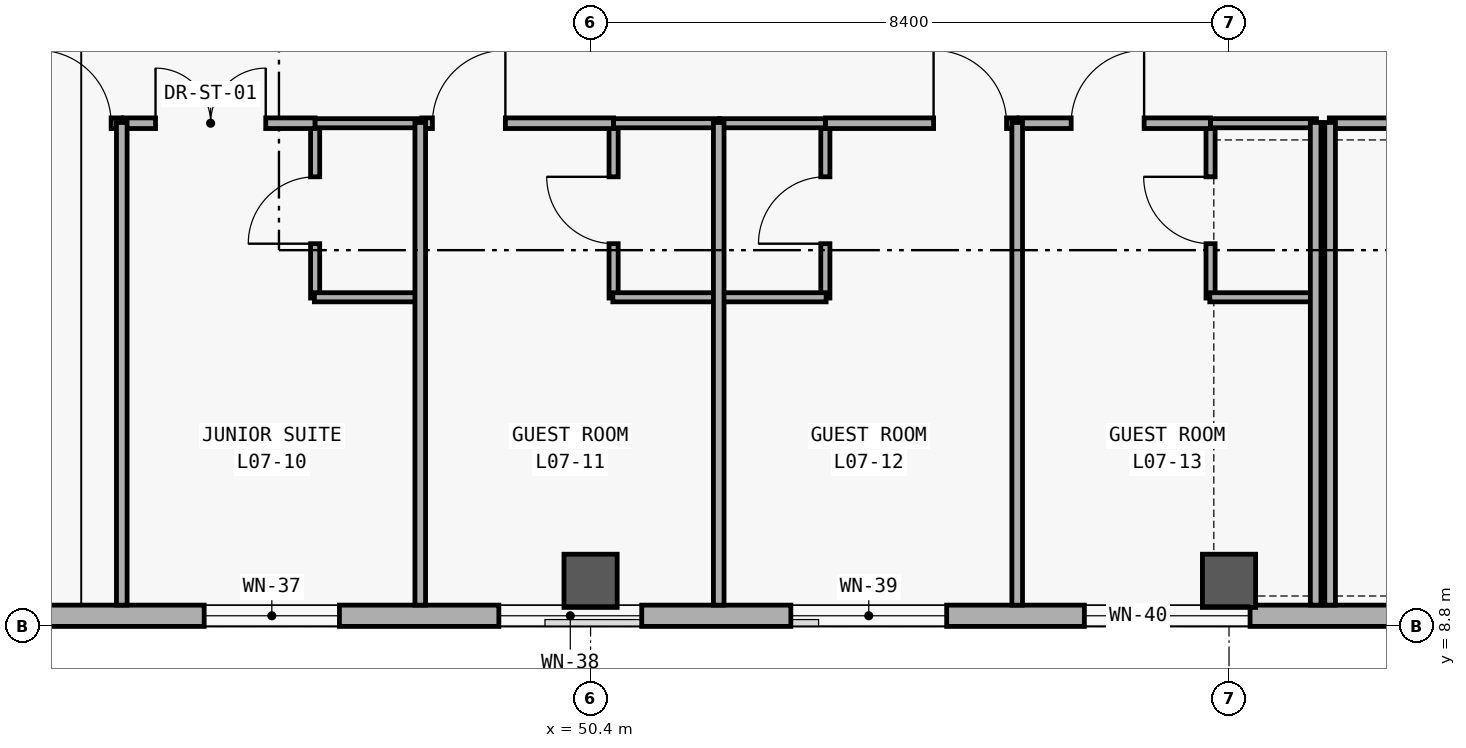
"""IFC4 building model, lengths in metres.
Left out: names, types, materials, properties, quantities, classifications, styles, units other than length and angle.
Written with IfcOpenShell. Run it as: python <this file> out.ifc"""

import sys

from ifc_helpers import new_model, si_unit, direction, frame, frame_2d, origin, origin_2d, place, context, subcontext, project, spatial, rectangle, extrude, element, fill, save


model = new_model("IFC4")
c1 = context("Model", 3, precision=1e-05, world=origin(), true_north=direction((0.0, 1.0)))
c2 = subcontext(c1, "Body", "Model", "MODEL_VIEW")
j1 = project(units=[si_unit("LENGTHUNIT", "METRE"), si_unit("PLANEANGLEUNIT", "RADIAN")], contexts=[c1])
p1 = place(None, origin())
s1 = spatial("IfcSite", under=j1, at=p1, CompositionType="ELEMENT")
p2 = place(p1, origin())
s2 = spatial("IfcBuilding", under=s1, at=p2, CompositionType="ELEMENT")
p3 = place(p2, frame((0.0, 0.0, 30.0)))
s3 = spatial("IfcBuildingStorey", under=s2, at=p3, CompositionType="ELEMENT", Elevation=30.0)
for number, where, z_axis, x_axis in (
    (1, (50.4, 9.4, 0.0), (0.0, 0.0, 1.0), (1.0, 0.0, 0.0)),
    (2, (58.8, 9.4, 0.0), (0.0, 0.0, 1.0), (1.0, 0.0, 0.0)),
):
    element("IfcColumn", number, at=place(p3, frame(where, z_axis=z_axis, x_axis=x_axis)), inside=s3, PredefinedType="COLUMN", context=c2, shape_type="SweptSolid", body=[
        extrude(rectangle(XDim=0.7, YDim=0.7, at=origin_2d()), origin(), (0.0, 0.0, 1.0), 3.6),
    ])
p4 = place(p3, frame((75.32, 8.94, 0.0), z_axis=(0.0, 0.0, 1.0), x_axis=(-1.0, 0.0, 0.0)))
e3 = element("IfcWall", 3, at=p4, inside=s3, PredefinedType="SOLIDWALL", context=c2, shape_type="SweptSolid", body=[
    extrude(rectangle(XDim=66.64, YDim=0.28, at=frame_2d((33.32, 0.0))), origin(), (0.0, 0.0, 1.0), 3.34),
])
p5 = place(p4, frame((6.47, 0.0, 0.85)))
e4 = element("IfcOpeningElement", 4, at=p5, cuts=e3, PredefinedType="OPENING", context=c2, shape_type="SweptSolid", body=[
    extrude(rectangle(XDim=2.4, YDim=1.8, at=frame_2d((1.2, 0.9))), frame((0.0, 0.15, 0.0), z_axis=(0.0, -1.0, 0.0), x_axis=(1.0, 0.0, 0.0)), (0.0, 0.0, 1.0), 0.3),
])
p6 = place(p4, frame((63.606, 0.0, 0.85)))
e5 = element("IfcOpeningElement", 5, at=p6, cuts=e3, PredefinedType="OPENING", context=c2, shape_type="SweptSolid", body=[
    extrude(rectangle(XDim=1.7, YDim=2.0, at=frame_2d((0.85, 1.0))), frame((0.0, 0.15, 0.0), z_axis=(0.0, -1.0, 0.0), x_axis=(1.0, 0.0, 0.0)), (0.0, 0.0, 1.0), 0.3),
])
p7 = place(p4, frame((59.379, 0.0, 0.85)))
e6 = element("IfcOpeningElement", 6, at=p7, cuts=e3, PredefinedType="OPENING", context=c2, shape_type="SweptSolid", body=[
    extrude(rectangle(XDim=2.3, YDim=2.05, at=frame_2d((1.15, 1.025))), frame((0.0, 0.15, 0.0), z_axis=(0.0, -1.0, 0.0), x_axis=(1.0, 0.0, 0.0)), (0.0, 0.0, 1.0), 0.3),
])
p8 = place(p4, frame((55.227, 0.0, 0.85)))
e7 = element("IfcOpeningElement", 7, at=p8, cuts=e3, PredefinedType="OPENING", context=c2, shape_type="SweptSolid", body=[
    extrude(rectangle(XDim=2.75, YDim=2.1, at=frame_2d((1.375, 1.05))), frame((0.0, 0.15, 0.0), z_axis=(0.0, -1.0, 0.0), x_axis=(1.0, 0.0, 0.0)), (0.0, 0.0, 1.0), 0.3),
])
p9 = place(p4, frame((52.085, 0.0, 0.85)))
e8 = element("IfcOpeningElement", 8, at=p9, cuts=e3, PredefinedType="OPENING", context=c2, shape_type="SweptSolid", body=[
    extrude(rectangle(XDim=1.18, YDim=1.5, at=frame_2d((0.59, 0.75))), frame((0.0, 0.15, 0.0), z_axis=(0.0, -1.0, 0.0), x_axis=(1.0, 0.0, 0.0)), (0.0, 0.0, 1.0), 0.3),
])
p10 = place(p4, frame((48.108, 0.0, 0.85)))
e9 = element("IfcOpeningElement", 9, at=p10, cuts=e3, PredefinedType="OPENING", context=c2, shape_type="SweptSolid", body=[
    extrude(rectangle(XDim=1.28, YDim=1.6, at=frame_2d((0.64, 0.8))), frame((0.0, 0.15, 0.0), z_axis=(0.0, -1.0, 0.0), x_axis=(1.0, 0.0, 0.0)), (0.0, 0.0, 1.0), 0.3),
])
p11 = place(p4, frame((44.131, 0.0, 0.85)))
e10 = element("IfcOpeningElement", 10, at=p11, cuts=e3, PredefinedType="OPENING", context=c2, shape_type="SweptSolid", body=[
    extrude(rectangle(XDim=1.38, YDim=1.7, at=frame_2d((0.69, 0.85))), frame((0.0, 0.15, 0.0), z_axis=(0.0, -1.0, 0.0), x_axis=(1.0, 0.0, 0.0)), (0.0, 0.0, 1.0), 0.3),
])
p12 = place(p4, frame((40.155, 0.0, 0.85)))
e11 = element("IfcOpeningElement", 11, at=p12, cuts=e3, PredefinedType="OPENING", context=c2, shape_type="SweptSolid", body=[
    extrude(rectangle(XDim=1.48, YDim=1.8, at=frame_2d((0.74, 0.9))), frame((0.0, 0.15, 0.0), z_axis=(0.0, -1.0, 0.0), x_axis=(1.0, 0.0, 0.0)), (0.0, 0.0, 1.0), 0.3),
])
p13 = place(p4, frame((36.178, 0.0, 0.85)))
e12 = element("IfcOpeningElement", 12, at=p13, cuts=e3, PredefinedType="OPENING", context=c2, shape_type="SweptSolid", body=[
    extrude(rectangle(XDim=1.58, YDim=1.85, at=frame_2d((0.79, 0.925))), frame((0.0, 0.15, 0.0), z_axis=(0.0, -1.0, 0.0), x_axis=(1.0, 0.0, 0.0)), (0.0, 0.0, 1.0), 0.3),
])
p14 = place(p4, frame((32.201, 0.0, 0.85)))
e13 = element("IfcOpeningElement", 13, at=p14, cuts=e3, PredefinedType="OPENING", context=c2, shape_type="SweptSolid", body=[
    extrude(rectangle(XDim=1.68, YDim=1.9, at=frame_2d((0.84, 0.95))), frame((0.0, 0.15, 0.0), z_axis=(0.0, -1.0, 0.0), x_axis=(1.0, 0.0, 0.0)), (0.0, 0.0, 1.0), 0.3),
])
p15 = place(p4, frame((28.224, 0.0, 0.85)))
e14 = element("IfcOpeningElement", 14, at=p15, cuts=e3, PredefinedType="OPENING", context=c2, shape_type="SweptSolid", body=[
    extrude(rectangle(XDim=1.78, YDim=1.95, at=frame_2d((0.89, 0.975))), frame((0.0, 0.15, 0.0), z_axis=(0.0, -1.0, 0.0), x_axis=(1.0, 0.0, 0.0)), (0.0, 0.0, 1.0), 0.3),
])
p16 = place(p4, frame((24.247, 0.0, 0.85)))
e15 = element("IfcOpeningElement", 15, at=p16, cuts=e3, PredefinedType="OPENING", context=c2, shape_type="SweptSolid", body=[
    extrude(rectangle(XDim=1.88, YDim=1.95, at=frame_2d((0.94, 0.975))), frame((0.0, 0.15, 0.0), z_axis=(0.0, -1.0, 0.0), x_axis=(1.0, 0.0, 0.0)), (0.0, 0.0, 1.0), 0.3),
])
p17 = place(p4, frame((20.235, 0.0, 0.85)))
e16 = element("IfcOpeningElement", 16, at=p17, cuts=e3, PredefinedType="OPENING", context=c2, shape_type="SweptSolid", body=[
    extrude(rectangle(XDim=2.05, YDim=1.95, at=frame_2d((1.025, 0.975))), frame((0.0, 0.15, 0.0), z_axis=(0.0, -1.0, 0.0), x_axis=(1.0, 0.0, 0.0)), (0.0, 0.0, 1.0), 0.3),
])
p18 = place(p4, frame((16.243, 0.0, 0.85)))
e17 = element("IfcOpeningElement", 17, at=p18, cuts=e3, PredefinedType="OPENING", context=c2, shape_type="SweptSolid", body=[
    extrude(rectangle(XDim=2.18, YDim=1.95, at=frame_2d((1.09, 0.975))), frame((0.0, 0.15, 0.0), z_axis=(0.0, -1.0, 0.0), x_axis=(1.0, 0.0, 0.0)), (0.0, 0.0, 1.0), 0.3),
])
p19 = place(p3, frame((46.776, 13.12, 0.0), z_axis=(0.0, 0.0, 1.0), x_axis=(0.0, 1.0, 0.0)))
e18 = element("IfcWall", 18, at=p19, inside=s3, PredefinedType="PARTITIONING", context=c2, shape_type="SweptSolid", body=[
    extrude(rectangle(XDim=2.31, YDim=0.12, at=frame_2d((1.155, 0.0))), origin(), (0.0, 0.0, 1.0), 2.48),
])
p20 = place(p19, frame((0.715, 0.0, 0.0)))
e19 = element("IfcOpeningElement", 19, at=p20, cuts=e18, PredefinedType="OPENING", context=c2, shape_type="SweptSolid", body=[
    extrude(rectangle(XDim=0.88, YDim=2.15, at=frame_2d((0.44, 1.075))), frame((0.0, 0.07, 0.0), z_axis=(0.0, -1.0, 0.0), x_axis=(1.0, 0.0, 0.0)), (0.0, 0.0, 1.0), 0.14),
])
p21 = place(p3, frame((50.703, 13.12, 0.0), z_axis=(0.0, 0.0, 1.0), x_axis=(0.0, 1.0, 0.0)))
e20 = element("IfcWall", 20, at=p21, inside=s3, PredefinedType="PARTITIONING", context=c2, shape_type="SweptSolid", body=[
    extrude(rectangle(XDim=2.31, YDim=0.12, at=frame_2d((1.155, 0.0))), origin(), (0.0, 0.0, 1.0), 2.48),
])
p22 = place(p21, frame((0.715, 0.0, 0.0)))
e21 = element("IfcOpeningElement", 21, at=p22, cuts=e20, PredefinedType="OPENING", context=c2, shape_type="SweptSolid", body=[
    extrude(rectangle(XDim=0.88, YDim=2.15, at=frame_2d((0.44, 1.075))), frame((0.0, 0.07, 0.0), z_axis=(0.0, -1.0, 0.0), x_axis=(1.0, 0.0, 0.0)), (0.0, 0.0, 1.0), 0.14),
])
p23 = place(p3, frame((53.489, 13.12, 0.0), z_axis=(0.0, 0.0, 1.0), x_axis=(0.0, 1.0, 0.0)))
e22 = element("IfcWall", 22, at=p23, inside=s3, PredefinedType="PARTITIONING", context=c2, shape_type="SweptSolid", body=[
    extrude(rectangle(XDim=2.31, YDim=0.12, at=frame_2d((1.155, 0.0))), origin(), (0.0, 0.0, 1.0), 2.48),
])
p24 = place(p23, frame((0.715, 0.0, 0.0)))
e23 = element("IfcOpeningElement", 23, at=p24, cuts=e22, PredefinedType="OPENING", context=c2, shape_type="SweptSolid", body=[
    extrude(rectangle(XDim=0.88, YDim=2.15, at=frame_2d((0.44, 1.075))), frame((0.0, 0.07, 0.0), z_axis=(0.0, -1.0, 0.0), x_axis=(1.0, 0.0, 0.0)), (0.0, 0.0, 1.0), 0.14),
])
p25 = place(p3, frame((58.557, 13.12, 0.0), z_axis=(0.0, 0.0, 1.0), x_axis=(0.0, 1.0, 0.0)))
e24 = element("IfcWall", 24, at=p25, inside=s3, PredefinedType="PARTITIONING", context=c2, shape_type="SweptSolid", body=[
    extrude(rectangle(XDim=2.31, YDim=0.12, at=frame_2d((1.155, 0.0))), origin(), (0.0, 0.0, 1.0), 2.48),
])
p26 = place(p25, frame((0.715, 0.0, 0.0)))
e25 = element("IfcOpeningElement", 25, at=p26, cuts=e24, PredefinedType="OPENING", context=c2, shape_type="SweptSolid", body=[
    extrude(rectangle(XDim=0.88, YDim=2.15, at=frame_2d((0.44, 1.075))), frame((0.0, 0.07, 0.0), z_axis=(0.0, -1.0, 0.0), x_axis=(1.0, 0.0, 0.0)), (0.0, 0.0, 1.0), 0.14),
])
p27 = place(p3, frame((60.12, 15.42, 0.0), z_axis=(0.0, 0.0, 1.0), x_axis=(1.0, 0.0, 0.0)))
e26 = element("IfcWall", 26, at=p27, inside=s3, PredefinedType="PARTITIONING", context=c2, shape_type="SweptSolid", body=[
    extrude(rectangle(XDim=15.2, YDim=0.14, at=frame_2d((7.6, 0.0))), origin(), (0.0, 0.0, 1.0), 2.48),
])
p28 = place(p27, frame((2.071, 0.0, 0.0)))
e27 = element("IfcOpeningElement", 27, at=p28, cuts=e26, PredefinedType="OPENING", context=c2, shape_type="SweptSolid", body=[
    extrude(rectangle(XDim=1.08, YDim=2.25, at=frame_2d((0.54, 1.125))), frame((0.0, 0.08, 0.0), z_axis=(0.0, -1.0, 0.0), x_axis=(1.0, 0.0, 0.0)), (0.0, 0.0, 1.0), 0.16),
])
p29 = place(p3, frame((41.708, 15.42, 0.0), z_axis=(0.0, 0.0, 1.0), x_axis=(1.0, 0.0, 0.0)))
e28 = element("IfcWall", 28, at=p29, inside=s3, PredefinedType="PARTITIONING", context=c2, shape_type="SweptSolid", body=[
    extrude(rectangle(XDim=2.524, YDim=0.14, at=frame_2d((1.262, 0.0))), origin(), (0.0, 0.0, 1.0), 2.48),
])
p30 = place(p29, frame((1.424, 0.0, 0.0)))
e29 = element("IfcOpeningElement", 29, at=p30, cuts=e28, PredefinedType="OPENING", context=c2, shape_type="SweptSolid", body=[
    extrude(rectangle(XDim=0.96, YDim=2.25, at=frame_2d((0.48, 1.125))), frame((0.0, 0.08, 0.0), z_axis=(0.0, -1.0, 0.0), x_axis=(1.0, 0.0, 0.0)), (0.0, 0.0, 1.0), 0.16),
])
p31 = place(p3, frame((44.252, 15.42, 0.0), z_axis=(0.0, 0.0, 1.0), x_axis=(1.0, 0.0, 0.0)))
e30 = element("IfcWall", 30, at=p31, inside=s3, PredefinedType="PARTITIONING", context=c2, shape_type="SweptSolid", body=[
    extrude(rectangle(XDim=2.524, YDim=0.14, at=frame_2d((1.262, 0.0))), origin(), (0.0, 0.0, 1.0), 2.48),
])
p32 = place(p31, frame((0.424, 0.0, 0.0)))
e31 = element("IfcOpeningElement", 31, at=p32, cuts=e30, PredefinedType="OPENING", context=c2, shape_type="SweptSolid", body=[
    extrude(rectangle(XDim=1.45, YDim=2.3, at=frame_2d((0.725, 1.15))), frame((0.0, 0.08, 0.0), z_axis=(0.0, -1.0, 0.0), x_axis=(1.0, 0.0, 0.0)), (0.0, 0.0, 1.0), 0.16),
])
p33 = place(p3, frame((48.179, 15.42, 0.0), z_axis=(0.0, 0.0, 1.0), x_axis=(1.0, 0.0, 0.0)))
e32 = element("IfcWall", 32, at=p33, inside=s3, PredefinedType="PARTITIONING", context=c2, shape_type="SweptSolid", body=[
    extrude(rectangle(XDim=2.524, YDim=0.14, at=frame_2d((1.262, 0.0))), origin(), (0.0, 0.0, 1.0), 2.48),
])
p34 = place(p33, frame((0.14, 0.0, 0.0)))
e33 = element("IfcOpeningElement", 33, at=p34, cuts=e32, PredefinedType="OPENING", context=c2, shape_type="SweptSolid", body=[
    extrude(rectangle(XDim=0.96, YDim=2.25, at=frame_2d((0.48, 1.125))), frame((0.0, 0.08, 0.0), z_axis=(0.0, -1.0, 0.0), x_axis=(1.0, 0.0, 0.0)), (0.0, 0.0, 1.0), 0.16),
])
p35 = place(p3, frame((53.489, 15.42, 0.0), z_axis=(0.0, 0.0, 1.0), x_axis=(1.0, 0.0, 0.0)))
e34 = element("IfcWall", 34, at=p35, inside=s3, PredefinedType="PARTITIONING", context=c2, shape_type="SweptSolid", body=[
    extrude(rectangle(XDim=2.524, YDim=0.14, at=frame_2d((1.262, 0.0))), origin(), (0.0, 0.0, 1.0), 2.48),
])
p36 = place(p35, frame((1.424, 0.0, 0.0)))
e35 = element("IfcOpeningElement", 35, at=p36, cuts=e34, PredefinedType="OPENING", context=c2, shape_type="SweptSolid", body=[
    extrude(rectangle(XDim=0.96, YDim=2.25, at=frame_2d((0.48, 1.125))), frame((0.0, 0.08, 0.0), z_axis=(0.0, -1.0, 0.0), x_axis=(1.0, 0.0, 0.0)), (0.0, 0.0, 1.0), 0.16),
])
p37 = place(p3, frame((56.033, 15.42, 0.0), z_axis=(0.0, 0.0, 1.0), x_axis=(1.0, 0.0, 0.0)))
e36 = element("IfcWall", 36, at=p37, inside=s3, PredefinedType="PARTITIONING", context=c2, shape_type="SweptSolid", body=[
    extrude(rectangle(XDim=2.524, YDim=0.14, at=frame_2d((1.262, 0.0))), origin(), (0.0, 0.0, 1.0), 2.48),
])
p38 = place(p37, frame((0.69, 0.0, 0.0)))
e37 = element("IfcOpeningElement", 37, at=p38, cuts=e36, PredefinedType="OPENING", context=c2, shape_type="SweptSolid", body=[
    extrude(rectangle(XDim=0.96, YDim=2.25, at=frame_2d((0.48, 1.125))), frame((0.0, 0.08, 0.0), z_axis=(0.0, -1.0, 0.0), x_axis=(1.0, 0.0, 0.0)), (0.0, 0.0, 1.0), 0.16),
])
p39 = place(p3, frame((46.766, 13.13, 0.0), z_axis=(0.0, 0.0, 1.0), x_axis=(1.0, 0.0, 0.0)))
e38 = element("IfcWall", 38, at=p39, inside=s3, PredefinedType="PARTITIONING", context=c2, shape_type="SweptSolid", body=[
    extrude(rectangle(XDim=1.403, YDim=0.12, at=frame_2d((0.701, 0.0))), origin(), (0.0, 0.0, 1.0), 2.48),
])
p40 = place(p3, frame((46.776, 15.42, 0.0), z_axis=(0.0, 0.0, 1.0), x_axis=(1.0, 0.0, 0.0)))
e39 = element("IfcWall", 39, at=p40, inside=s3, PredefinedType="PARTITIONING", context=c2, shape_type="SweptSolid", body=[
    extrude(rectangle(XDim=1.393, YDim=0.12, at=frame_2d((0.697, 0.0))), origin(), (0.0, 0.0, 1.0), 2.48),
])
p41 = place(p3, frame((50.693, 13.13, 0.0), z_axis=(0.0, 0.0, 1.0), x_axis=(1.0, 0.0, 0.0)))
e40 = element("IfcWall", 40, at=p41, inside=s3, PredefinedType="PARTITIONING", context=c2, shape_type="SweptSolid", body=[
    extrude(rectangle(XDim=1.403, YDim=0.12, at=frame_2d((0.701, 0.0))), origin(), (0.0, 0.0, 1.0), 2.48),
])
p42 = place(p3, frame((50.703, 15.42, 0.0), z_axis=(0.0, 0.0, 1.0), x_axis=(1.0, 0.0, 0.0)))
e41 = element("IfcWall", 41, at=p42, inside=s3, PredefinedType="PARTITIONING", context=c2, shape_type="SweptSolid", body=[
    extrude(rectangle(XDim=1.393, YDim=0.12, at=frame_2d((0.697, 0.0))), origin(), (0.0, 0.0, 1.0), 2.48),
])
p43 = place(p3, frame((52.096, 13.13, 0.0), z_axis=(0.0, 0.0, 1.0), x_axis=(1.0, 0.0, 0.0)))
e42 = element("IfcWall", 42, at=p43, inside=s3, PredefinedType="PARTITIONING", context=c2, shape_type="SweptSolid", body=[
    extrude(rectangle(XDim=1.403, YDim=0.12, at=frame_2d((0.702, 0.0))), origin(), (0.0, 0.0, 1.0), 2.48),
])
p44 = place(p3, frame((52.096, 15.42, 0.0), z_axis=(0.0, 0.0, 1.0), x_axis=(1.0, 0.0, 0.0)))
e43 = element("IfcWall", 43, at=p44, inside=s3, PredefinedType="PARTITIONING", context=c2, shape_type="SweptSolid", body=[
    extrude(rectangle(XDim=1.393, YDim=0.12, at=frame_2d((0.697, 0.0))), origin(), (0.0, 0.0, 1.0), 2.48),
])
p45 = place(p3, frame((58.547, 13.13, 0.0), z_axis=(0.0, 0.0, 1.0), x_axis=(1.0, 0.0, 0.0)))
e44 = element("IfcWall", 44, at=p45, inside=s3, PredefinedType="PARTITIONING", context=c2, shape_type="SweptSolid", body=[
    extrude(rectangle(XDim=1.403, YDim=0.12, at=frame_2d((0.701, 0.0))), origin(), (0.0, 0.0, 1.0), 2.48),
])
p46 = place(p3, frame((58.557, 15.42, 0.0), z_axis=(0.0, 0.0, 1.0), x_axis=(1.0, 0.0, 0.0)))
e45 = element("IfcWall", 45, at=p46, inside=s3, PredefinedType="PARTITIONING", context=c2, shape_type="SweptSolid", body=[
    extrude(rectangle(XDim=1.393, YDim=0.12, at=frame_2d((0.697, 0.0))), origin(), (0.0, 0.0, 1.0), 2.48),
])
for number, where, z_axis, x_axis in (
    (46, (60.13, 9.08, 0.0), (0.0, 0.0, 1.0), (0.0, 1.0, 0.0)),
    (47, (44.232, 9.08, 0.0), (0.0, 0.0, 1.0), (0.0, 1.0, 0.0)),
    (48, (48.159, 9.08, 0.0), (0.0, 0.0, 1.0), (0.0, 1.0, 0.0)),
    (49, (52.086, 9.08, 0.0), (0.0, 0.0, 1.0), (0.0, 1.0, 0.0)),
    (50, (56.013, 9.08, 0.0), (0.0, 0.0, 1.0), (0.0, 1.0, 0.0)),
    (51, (59.94, 9.08, 0.0), (0.0, 0.0, 1.0), (0.0, 1.0, 0.0)),
):
    element("IfcWall", number, at=place(p3, frame(where, z_axis=z_axis, x_axis=x_axis)), inside=s3, PredefinedType="PARTITIONING", context=c2, shape_type="SweptSolid", body=[
        extrude(rectangle(XDim=6.35, YDim=0.14, at=frame_2d((3.175, 0.0))), origin(), (0.0, 0.0, 1.0), 2.48),
    ])
p47 = place(p15, origin())
e52 = element("IfcWindow", 52, at=p47, inside=s3, PartitioningType="SINGLE_PANEL", PredefinedType="WINDOW", context=c2, shape_type="SweptSolid", body=[
    extrude(rectangle(XDim=1.78, YDim=1.95, at=frame_2d((0.89, 0.975))), frame((0.0, 0.03, 0.0), z_axis=(0.0, -1.0, 0.0), x_axis=(1.0, 0.0, 0.0)), (0.0, 0.0, 1.0), 0.06),
])
fill(e14, e52)
p48 = place(p16, origin())
e53 = element("IfcWindow", 53, at=p48, inside=s3, PartitioningType="SINGLE_PANEL", PredefinedType="WINDOW", context=c2, shape_type="SweptSolid", body=[
    extrude(rectangle(XDim=1.88, YDim=1.95, at=frame_2d((0.94, 0.975))), frame((0.0, 0.03, 0.0), z_axis=(0.0, -1.0, 0.0), x_axis=(1.0, 0.0, 0.0)), (0.0, 0.0, 1.0), 0.06),
])
fill(e15, e53)
p49 = place(p17, origin())
e54 = element("IfcWindow", 54, at=p49, inside=s3, PartitioningType="SINGLE_PANEL", PredefinedType="WINDOW", context=c2, shape_type="SweptSolid", body=[
    extrude(rectangle(XDim=2.05, YDim=1.95, at=frame_2d((1.025, 0.975))), frame((0.0, 0.03, 0.0), z_axis=(0.0, -1.0, 0.0), x_axis=(1.0, 0.0, 0.0)), (0.0, 0.0, 1.0), 0.06),
])
fill(e16, e54)
p50 = place(p18, origin())
e55 = element("IfcWindow", 55, at=p50, inside=s3, PartitioningType="SINGLE_PANEL", PredefinedType="WINDOW", context=c2, shape_type="SweptSolid", body=[
    extrude(rectangle(XDim=2.18, YDim=1.95, at=frame_2d((1.09, 0.975))), frame((0.0, 0.03, 0.0), z_axis=(0.0, -1.0, 0.0), x_axis=(1.0, 0.0, 0.0)), (0.0, 0.0, 1.0), 0.06),
])
fill(e17, e55)
p51 = place(p20, origin())
e56 = element("IfcDoor", 56, at=p51, inside=s3, OperationType="SINGLE_SWING_LEFT", PredefinedType="DOOR", context=c2, shape_type="SweptSolid", body=[
    extrude(rectangle(XDim=0.88, YDim=2.15, at=frame_2d((0.44, 1.075))), frame((0.0, 0.025, 0.0), z_axis=(0.0, -1.0, 0.0), x_axis=(1.0, 0.0, 0.0)), (0.0, 0.0, 1.0), 0.05),
])
fill(e19, e56)
p52 = place(p22, origin())
e57 = element("IfcDoor", 57, at=p52, inside=s3, OperationType="SINGLE_SWING_RIGHT", PredefinedType="DOOR", context=c2, shape_type="SweptSolid", body=[
    extrude(rectangle(XDim=0.88, YDim=2.15, at=frame_2d((0.44, 1.075))), frame((0.0, 0.025, 0.0), z_axis=(0.0, -1.0, 0.0), x_axis=(1.0, 0.0, 0.0)), (0.0, 0.0, 1.0), 0.05),
])
fill(e21, e57)
p53 = place(p24, origin())
e58 = element("IfcDoor", 58, at=p53, inside=s3, OperationType="SINGLE_SWING_LEFT", PredefinedType="DOOR", context=c2, shape_type="SweptSolid", body=[
    extrude(rectangle(XDim=0.88, YDim=2.15, at=frame_2d((0.44, 1.075))), frame((0.0, 0.025, 0.0), z_axis=(0.0, -1.0, 0.0), x_axis=(1.0, 0.0, 0.0)), (0.0, 0.0, 1.0), 0.05),
])
fill(e23, e58)
p54 = place(p26, origin())
e59 = element("IfcDoor", 59, at=p54, inside=s3, OperationType="SINGLE_SWING_RIGHT", PredefinedType="DOOR", context=c2, shape_type="SweptSolid", body=[
    extrude(rectangle(XDim=0.88, YDim=2.15, at=frame_2d((0.44, 1.075))), frame((0.0, 0.025, 0.0), z_axis=(0.0, -1.0, 0.0), x_axis=(1.0, 0.0, 0.0)), (0.0, 0.0, 1.0), 0.05),
])
fill(e25, e59)
p55 = place(p30, origin())
e60 = element("IfcDoor", 60, at=p55, inside=s3, OperationType="SINGLE_SWING_LEFT", PredefinedType="DOOR", context=c2, shape_type="SweptSolid", body=[
    extrude(rectangle(XDim=0.96, YDim=2.25, at=frame_2d((0.48, 1.125))), frame((0.0, 0.025, 0.0), z_axis=(0.0, -1.0, 0.0), x_axis=(1.0, 0.0, 0.0)), (0.0, 0.0, 1.0), 0.05),
])
fill(e29, e60)
p56 = place(p32, origin())
e61 = element("IfcDoor", 61, at=p56, inside=s3, OperationType="DOUBLE_DOOR_SINGLE_SWING", PredefinedType="DOOR", context=c2, shape_type="SweptSolid", body=[
    extrude(rectangle(XDim=1.45, YDim=2.3, at=frame_2d((0.725, 1.15))), frame((0.0, 0.025, 0.0), z_axis=(0.0, -1.0, 0.0), x_axis=(1.0, 0.0, 0.0)), (0.0, 0.0, 1.0), 0.05),
])
fill(e31, e61)
p57 = place(p34, origin())
e62 = element("IfcDoor", 62, at=p57, inside=s3, OperationType="SINGLE_SWING_RIGHT", PredefinedType="DOOR", context=c2, shape_type="SweptSolid", body=[
    extrude(rectangle(XDim=0.96, YDim=2.25, at=frame_2d((0.48, 1.125))), frame((0.0, 0.025, 0.0), z_axis=(0.0, -1.0, 0.0), x_axis=(1.0, 0.0, 0.0)), (0.0, 0.0, 1.0), 0.05),
])
fill(e33, e62)
p58 = place(p36, origin())
e63 = element("IfcDoor", 63, at=p58, inside=s3, OperationType="SINGLE_SWING_LEFT", PredefinedType="DOOR", context=c2, shape_type="SweptSolid", body=[
    extrude(rectangle(XDim=0.96, YDim=2.25, at=frame_2d((0.48, 1.125))), frame((0.0, 0.025, 0.0), z_axis=(0.0, -1.0, 0.0), x_axis=(1.0, 0.0, 0.0)), (0.0, 0.0, 1.0), 0.05),
])
fill(e35, e63)
p59 = place(p38, origin())
e64 = element("IfcDoor", 64, at=p59, inside=s3, OperationType="SINGLE_SWING_RIGHT", PredefinedType="DOOR", context=c2, shape_type="SweptSolid", body=[
    extrude(rectangle(XDim=0.96, YDim=2.25, at=frame_2d((0.48, 1.125))), frame((0.0, 0.025, 0.0), z_axis=(0.0, -1.0, 0.0), x_axis=(1.0, 0.0, 0.0)), (0.0, 0.0, 1.0), 0.05),
])
fill(e37, e64)
save(model, sys.argv[1])
